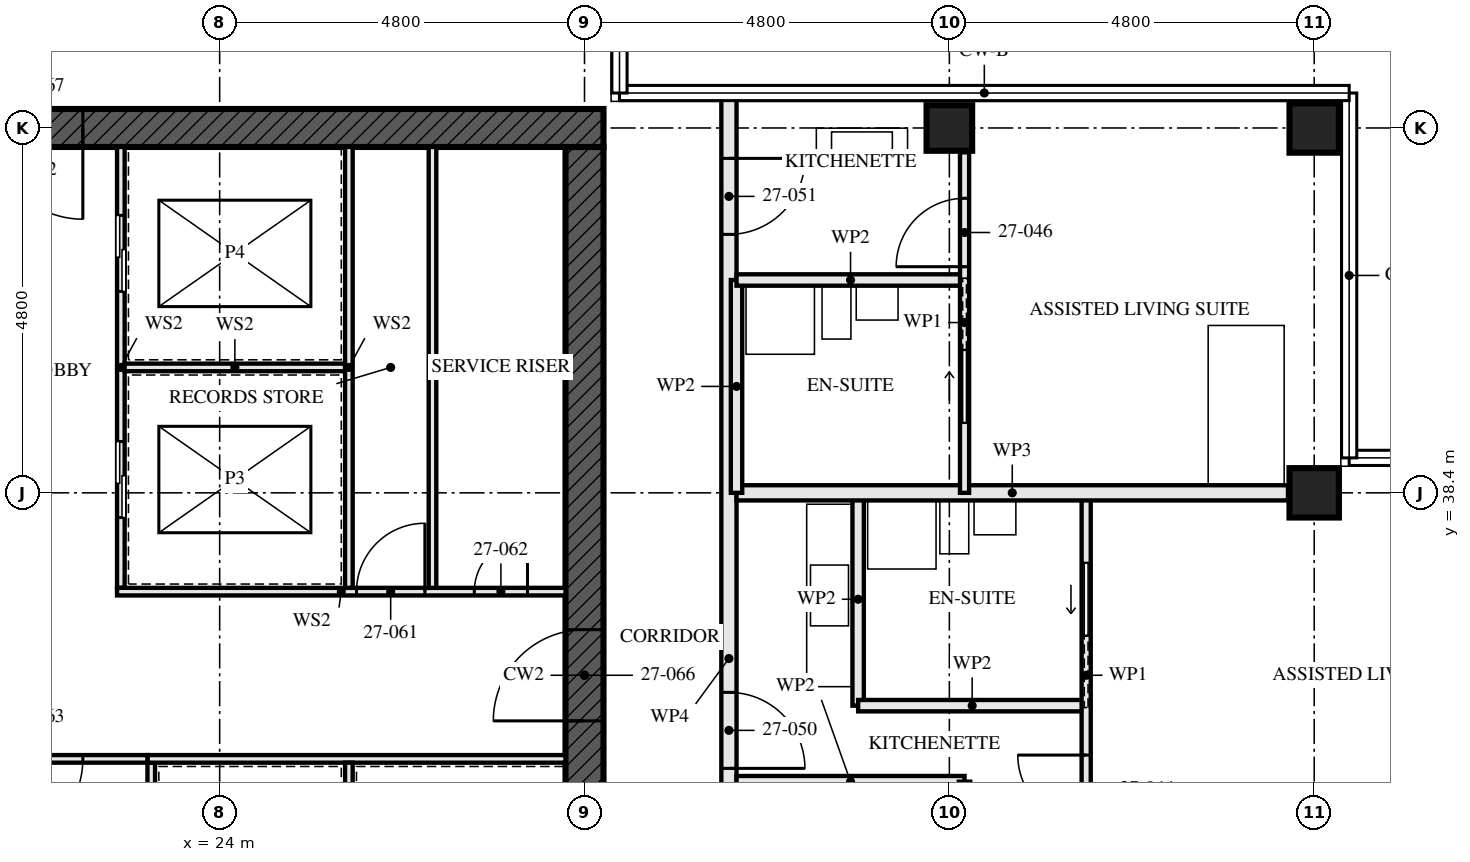
"""IFC4 building model, lengths in metres.
Left out: names, types, materials, properties, quantities, classifications, styles, units other than length and angle.
Written with IfcOpenShell. Run it as: python <this file> out.ifc"""

import sys

from ifc_helpers import new_model, si_unit, direction, frame, frame_2d, origin, origin_2d, place, context, subcontext, project, spatial, rectangle, hollow_rectangle, extrude, element, fill, save


model = new_model("IFC4")
c1 = context("Model", 3, precision=1e-05, world=origin(), true_north=direction((0.0, 1.0)))
c2 = subcontext(c1, "Body", "Model", "MODEL_VIEW")
j1 = project(units=[si_unit("LENGTHUNIT", "METRE"), si_unit("PLANEANGLEUNIT", "RADIAN")], contexts=[c1])
p1 = place(None, origin())
s1 = spatial("IfcSite", under=j1, at=p1, CompositionType="ELEMENT")
p2 = place(p1, origin())
s2 = spatial("IfcBuilding", under=s1, at=p2, CompositionType="ELEMENT")
p3 = place(p2, frame((0.0, 0.0, 101.5)))
s3 = spatial("IfcBuildingStorey", under=s2, at=p3, CompositionType="ELEMENT", Elevation=101.5)
p4 = place(p3, frame((33.6, 43.2, 0.0), z_axis=(0.0, 0.0, 1.0), x_axis=(0.0, 1.0, 0.0)))
e1 = element("IfcColumn", 1, at=p4, inside=s3, PredefinedType="COLUMN", context=c2, shape_type="SweptSolid", body=[
    extrude(hollow_rectangle(XDim=0.6, YDim=0.6, WallThickness=0.08, at=origin_2d()), origin(), (0.0, 0.0, 1.0), 3.5),
])
for number, where, z_axis, x_axis in (
    (2, (38.4, 38.4, 0.0), (0.0, 0.0, 1.0), (0.0, 1.0, 0.0)),
    (3, (38.4, 43.2, 0.0), (0.0, 0.0, 1.0), (0.0, 1.0, 0.0)),
):
    element("IfcColumn", number, at=place(p3, frame(where, z_axis=z_axis, x_axis=x_axis)), inside=s3, PredefinedType="COLUMN", context=c2, shape_type="SweptSolid", body=[
        extrude(hollow_rectangle(XDim=0.65, YDim=0.65, WallThickness=0.08, at=origin_2d()), origin(), (0.0, 0.0, 1.0), 3.5),
    ])
p5 = place(p3, frame((29.05, 43.2, -0.17), z_axis=(0.0, 0.0, 1.0), x_axis=(-1.0, 0.0, 0.0)))
e4 = element("IfcWall", 4, at=p5, inside=s3, PredefinedType="SHEAR", context=c2, shape_type="SweptSolid", body=[
    extrude(rectangle(XDim=14.9, YDim=0.5, at=frame_2d((7.45, 0.0))), origin(), (0.0, 0.0, 1.0), 3.5),
])
p6 = place(p5, frame((6.85, 0.0, 0.17)))
e5 = element("IfcOpeningElement", 5, at=p6, cuts=e4, PredefinedType="OPENING", context=c2, shape_type="SweptSolid", body=[
    extrude(rectangle(XDim=1.2, YDim=2.1, at=frame_2d((0.6, 1.05))), frame((0.0, 0.26, 0.0), z_axis=(0.0, -1.0, 0.0), x_axis=(1.0, 0.0, 0.0)), (0.0, 0.0, 1.0), 0.521),
])
p7 = place(p3, frame((28.8, 29.05, -0.17), z_axis=(0.0, 0.0, 1.0), x_axis=(0.0, 1.0, 0.0)))
e6 = element("IfcWall", 6, at=p7, inside=s3, PredefinedType="SHEAR", context=c2, shape_type="SweptSolid", body=[
    extrude(rectangle(XDim=13.9, YDim=0.5, at=frame_2d((6.95, 0.0))), origin(), (0.0, 0.0, 1.0), 3.5),
])
p8 = place(p7, frame((6.35, 0.0, 0.17)))
e7 = element("IfcOpeningElement", 7, at=p8, cuts=e6, PredefinedType="OPENING", context=c2, shape_type="SweptSolid", body=[
    extrude(rectangle(XDim=1.2, YDim=2.1, at=frame_2d((0.6, 1.05))), frame((0.0, 0.26, 0.0), z_axis=(0.0, -1.0, 0.0), x_axis=(1.0, 0.0, 0.0)), (0.0, 0.0, 1.0), 0.521),
])
p9 = place(p3, frame((33.8, 32.2, 0.0), z_axis=(0.0, 0.0, 1.0), x_axis=(0.0, 1.0, 0.0)))
e8 = element("IfcWall", 8, at=p9, inside=s3, PredefinedType="PARTITIONING", context=c2, shape_type="SweptSolid", body=[
    extrude(rectangle(XDim=2.4, YDim=0.15, at=frame_2d((1.2, 0.0))), origin(), (0.0, 0.0, 1.0), 2.55),
])
for number, where, z_axis, x_axis in (
    (9, (33.8, 34.6, 0.0), (0.0, 0.0, 1.0), (-1.0, 0.0, 0.0)),
    (10, (35.4, 35.6, 0.0), (0.0, 0.0, 1.0), (-1.0, 0.0, 0.0)),
):
    element("IfcWall", number, at=place(p3, frame(where, z_axis=z_axis, x_axis=x_axis)), inside=s3, PredefinedType="PARTITIONING", context=c2, shape_type="SweptSolid", body=[
        extrude(rectangle(XDim=3.0, YDim=0.15, at=frame_2d((1.5, 0.0))), origin(), (0.0, 0.0, 1.0), 3.33),
    ])
p10 = place(p3, frame((32.4, 35.6, 0.0), z_axis=(0.0, 0.0, 1.0), x_axis=(0.0, 1.0, 0.0)))
e11 = element("IfcWall", 11, at=p10, inside=s3, PredefinedType="PARTITIONING", context=c2, shape_type="SweptSolid", body=[
    extrude(rectangle(XDim=2.8, YDim=0.15, at=frame_2d((1.4, 0.0))), origin(), (0.0, 0.0, 1.0), 3.33),
])
p11 = place(p3, frame((35.4, 33.6, 0.0), z_axis=(0.0, 0.0, 1.0), x_axis=(0.0, 1.0, 0.0)))
e12 = element("IfcWall", 12, at=p11, inside=s3, PredefinedType="PARTITIONING", context=c2, shape_type="SweptSolid", body=[
    extrude(rectangle(XDim=4.8, YDim=0.12, at=frame_2d((2.4, 0.0))), origin(), (0.0, 0.0, 1.0), 3.33),
])
p12 = place(p11, frame((0.45, 0.0, 0.0)))
e13 = element("IfcOpeningElement", 13, at=p12, cuts=e12, PredefinedType="OPENING", context=c2, shape_type="SweptSolid", body=[
    extrude(rectangle(XDim=0.9, YDim=2.1, at=frame_2d((0.45, 1.05))), frame((0.0, 0.071, 0.0), z_axis=(0.0, -1.0, 0.0), x_axis=(1.0, 0.0, 0.0)), (0.0, 0.0, 1.0), 0.141),
])
p13 = place(p11, frame((2.925, 0.0, 0.0)))
e14 = element("IfcOpeningElement", 14, at=p13, cuts=e12, PredefinedType="OPENING", context=c2, shape_type="SweptSolid", body=[
    extrude(rectangle(XDim=0.95, YDim=2.1, at=frame_2d((0.475, 1.05))), frame((0.0, 0.071, 0.0), z_axis=(0.0, -1.0, 0.0), x_axis=(1.0, 0.0, 0.0)), (0.0, 0.0, 1.0), 0.141),
])
p14 = place(p3, frame((38.055, 38.4, 0.0), z_axis=(0.0, 0.0, 1.0), x_axis=(-1.0, 0.0, 0.0)))
e15 = element("IfcWall", 15, at=p14, inside=s3, PredefinedType="PARTITIONING", context=c2, shape_type="SweptSolid", body=[
    extrude(rectangle(XDim=7.255, YDim=0.2, at=frame_2d((3.627, 0.0))), origin(), (0.0, 0.0, 1.0), 2.55),
])
p15 = place(p3, frame((33.8, 41.2, 0.0), z_axis=(0.0, 0.0, 1.0), x_axis=(-1.0, 0.0, 0.0)))
e16 = element("IfcWall", 16, at=p15, inside=s3, PredefinedType="PARTITIONING", context=c2, shape_type="SweptSolid", body=[
    extrude(rectangle(XDim=3.0, YDim=0.15, at=frame_2d((1.5, 0.0))), origin(), (0.0, 0.0, 1.0), 3.33),
])
p16 = place(p3, frame((30.8, 38.4, 0.0), z_axis=(0.0, 0.0, 1.0), x_axis=(0.0, 1.0, 0.0)))
e17 = element("IfcWall", 17, at=p16, inside=s3, PredefinedType="PARTITIONING", context=c2, shape_type="SweptSolid", body=[
    extrude(rectangle(XDim=2.8, YDim=0.15, at=frame_2d((1.4, 0.0))), origin(), (0.0, 0.0, 1.0), 3.33),
])
p17 = place(p3, frame((33.8, 38.4, 0.0), z_axis=(0.0, 0.0, 1.0), x_axis=(0.0, 1.0, 0.0)))
e18 = element("IfcWall", 18, at=p17, inside=s3, PredefinedType="PARTITIONING", context=c2, shape_type="SweptSolid", body=[
    extrude(rectangle(XDim=4.48, YDim=0.12, at=frame_2d((2.24, 0.0))), origin(), (0.0, 0.0, 1.0), 3.33),
])
p18 = place(p17, frame((2.975, 0.0, 0.0)))
e19 = element("IfcOpeningElement", 19, at=p18, cuts=e18, PredefinedType="OPENING", context=c2, shape_type="SweptSolid", body=[
    extrude(rectangle(XDim=0.9, YDim=2.1, at=frame_2d((0.45, 1.05))), frame((0.0, 0.071, 0.0), z_axis=(0.0, -1.0, 0.0), x_axis=(1.0, 0.0, 0.0)), (0.0, 0.0, 1.0), 0.141),
])
p19 = place(p17, frame((0.925, 0.0, 0.0)))
e20 = element("IfcOpeningElement", 20, at=p19, cuts=e18, PredefinedType="OPENING", context=c2, shape_type="SweptSolid", body=[
    extrude(rectangle(XDim=0.95, YDim=2.1, at=frame_2d((0.475, 1.05))), frame((0.0, 0.071, 0.0), z_axis=(0.0, -1.0, 0.0), x_axis=(1.0, 0.0, 0.0)), (0.0, 0.0, 1.0), 0.141),
])
p20 = place(p3, frame((30.7, 28.8, 0.0), z_axis=(0.0, 0.0, 1.0), x_axis=(0.0, 1.0, 0.0)))
e21 = element("IfcWall", 21, at=p20, inside=s3, PredefinedType="PARTITIONING", context=c2, shape_type="SweptSolid", body=[
    extrude(rectangle(XDim=14.84, YDim=0.2, at=frame_2d((7.42, 0.0))), origin(), (0.0, 0.0, 1.0), 2.32),
])
p21 = place(p20, frame((1.4, 0.0, 0.0)))
e22 = element("IfcOpeningElement", 22, at=p21, cuts=e21, PredefinedType="OPENING", context=c2, shape_type="SweptSolid", body=[
    extrude(rectangle(XDim=1.0, YDim=2.1, at=frame_2d((0.5, 1.05))), frame((0.0, 0.111, 0.0), z_axis=(0.0, -1.0, 0.0), x_axis=(1.0, 0.0, 0.0)), (0.0, 0.0, 1.0), 0.221),
])
p22 = place(p20, frame((4.1, 0.0, 0.0)))
e23 = element("IfcOpeningElement", 23, at=p22, cuts=e21, PredefinedType="OPENING", context=c2, shape_type="SweptSolid", body=[
    extrude(rectangle(XDim=1.0, YDim=2.1, at=frame_2d((0.5, 1.05))), frame((0.0, 0.111, 0.0), z_axis=(0.0, -1.0, 0.0), x_axis=(1.0, 0.0, 0.0)), (0.0, 0.0, 1.0), 0.221),
])
p23 = place(p20, frame((5.975, 0.0, 0.0)))
e24 = element("IfcOpeningElement", 24, at=p23, cuts=e21, PredefinedType="OPENING", context=c2, shape_type="SweptSolid", body=[
    extrude(rectangle(XDim=1.0, YDim=2.1, at=frame_2d((0.5, 1.05))), frame((0.0, 0.111, 0.0), z_axis=(0.0, -1.0, 0.0), x_axis=(1.0, 0.0, 0.0)), (0.0, 0.0, 1.0), 0.221),
])
p24 = place(p20, frame((13.0, 0.0, 0.0)))
e25 = element("IfcOpeningElement", 25, at=p24, cuts=e21, PredefinedType="OPENING", context=c2, shape_type="SweptSolid", body=[
    extrude(rectangle(XDim=1.0, YDim=2.1, at=frame_2d((0.5, 1.05))), frame((0.0, 0.111, 0.0), z_axis=(0.0, -1.0, 0.0), x_axis=(1.0, 0.0, 0.0)), (0.0, 0.0, 1.0), 0.221),
])
p25 = place(p3, frame((26.8, 37.15, 0.0), z_axis=(0.0, 0.0, 1.0), x_axis=(0.0, 1.0, 0.0)))
e26 = element("IfcWall", 26, at=p25, inside=s3, PredefinedType="SOLIDWALL", context=c2, shape_type="SweptSolid", body=[
    extrude(rectangle(XDim=5.8, YDim=0.1, at=frame_2d((2.9, 0.0))), origin(), (0.0, 0.0, 1.0), 3.33),
])
p26 = place(p3, frame((22.7, 37.15, 0.0), z_axis=(0.0, 0.0, 1.0), x_axis=(0.0, 1.0, 0.0)))
e27 = element("IfcWall", 27, at=p26, inside=s3, PredefinedType="SOLIDWALL", context=c2, shape_type="SweptSolid", body=[
    extrude(rectangle(XDim=5.8, YDim=0.1, at=frame_2d((2.9, 0.0))), origin(), (0.0, 0.0, 1.0), 3.33),
])
p27 = place(p26, frame((0.925, 0.0, 0.0)))
e28 = element("IfcOpeningElement", 28, at=p27, cuts=e27, PredefinedType="OPENING", context=c2, shape_type="SweptSolid", body=[
    extrude(rectangle(XDim=1.0, YDim=2.1, at=frame_2d((0.5, 1.05))), frame((0.0, 0.061, 0.0), z_axis=(0.0, -1.0, 0.0), x_axis=(1.0, 0.0, 0.0)), (0.0, 0.0, 1.0), 0.121),
])
p28 = place(p26, frame((3.9, 0.0, 0.0)))
e29 = element("IfcOpeningElement", 29, at=p28, cuts=e27, PredefinedType="OPENING", context=c2, shape_type="SweptSolid", body=[
    extrude(rectangle(XDim=1.0, YDim=2.1, at=frame_2d((0.5, 1.05))), frame((0.0, 0.061, 0.0), z_axis=(0.0, -1.0, 0.0), x_axis=(1.0, 0.0, 0.0)), (0.0, 0.0, 1.0), 0.121),
])
p29 = place(p3, frame((23.1, 29.05, 0.0), z_axis=(0.0, 0.0, 1.0), x_axis=(0.0, 1.0, 0.0)))
e30 = element("IfcWall", 30, at=p29, inside=s3, PredefinedType="SOLIDWALL", context=c2, shape_type="SweptSolid", body=[
    extrude(rectangle(XDim=5.8, YDim=0.1, at=frame_2d((2.9, 0.0))), origin(), (0.0, 0.0, 1.0), 3.33),
])
p30 = place(p29, frame((1.0, 0.0, 0.0)))
e31 = element("IfcOpeningElement", 31, at=p30, cuts=e30, PredefinedType="OPENING", context=c2, shape_type="SweptSolid", body=[
    extrude(rectangle(XDim=0.7, YDim=2.1, at=frame_2d((0.35, 1.05))), frame((0.0, 0.061, 0.0), z_axis=(0.0, -1.0, 0.0), x_axis=(1.0, 0.0, 0.0)), (0.0, 0.0, 1.0), 0.121),
])
p31 = place(p3, frame((23.05, 34.9, 0.0), z_axis=(0.0, 0.0, 1.0), x_axis=(1.0, 0.0, 0.0)))
e32 = element("IfcWall", 32, at=p31, inside=s3, PredefinedType="SOLIDWALL", context=c2, shape_type="SweptSolid", body=[
    extrude(rectangle(XDim=5.5, YDim=0.1, at=frame_2d((2.75, 0.0))), origin(), (0.0, 0.0, 1.0), 3.33),
])
p32 = place(p3, frame((22.65, 37.1, 0.0), z_axis=(0.0, 0.0, 1.0), x_axis=(1.0, 0.0, 0.0)))
e33 = element("IfcWall", 33, at=p32, inside=s3, PredefinedType="SOLIDWALL", context=c2, shape_type="SweptSolid", body=[
    extrude(rectangle(XDim=5.9, YDim=0.1, at=frame_2d((2.95, 0.0))), origin(), (0.0, 0.0, 1.0), 3.33),
])
p33 = place(p32, frame((3.15, 0.0, 0.0)))
e34 = element("IfcOpeningElement", 34, at=p33, cuts=e33, PredefinedType="OPENING", context=c2, shape_type="SweptSolid", body=[
    extrude(rectangle(XDim=0.9, YDim=2.1, at=frame_2d((0.45, 1.05))), frame((0.0, 0.061, 0.0), z_axis=(0.0, -1.0, 0.0), x_axis=(1.0, 0.0, 0.0)), (0.0, 0.0, 1.0), 0.121),
])
p34 = place(p32, frame((4.7, 0.0, 0.0)))
e35 = element("IfcOpeningElement", 35, at=p34, cuts=e33, PredefinedType="OPENING", context=c2, shape_type="SweptSolid", body=[
    extrude(rectangle(XDim=0.7, YDim=2.1, at=frame_2d((0.35, 1.05))), frame((0.0, 0.061, 0.0), z_axis=(0.0, -1.0, 0.0), x_axis=(1.0, 0.0, 0.0)), (0.0, 0.0, 1.0), 0.121),
])
p35 = place(p3, frame((20.55, 34.9, 0.0), z_axis=(0.0, 0.0, 1.0), x_axis=(1.0, 0.0, 0.0)))
e36 = element("IfcWall", 36, at=p35, inside=s3, PredefinedType="SOLIDWALL", context=c2, shape_type="SweptSolid", body=[
    extrude(rectangle(XDim=2.5, YDim=0.1, at=frame_2d((1.25, 0.0))), origin(), (0.0, 0.0, 1.0), 3.33),
])
p36 = place(p35, frame((0.45, 0.0, 0.0)))
e37 = element("IfcOpeningElement", 37, at=p36, cuts=e36, PredefinedType="OPENING", context=c2, shape_type="SweptSolid", body=[
    extrude(rectangle(XDim=1.2, YDim=2.1, at=frame_2d((0.6, 1.05))), frame((0.0, 0.061, 0.0), z_axis=(0.0, -1.0, 0.0), x_axis=(1.0, 0.0, 0.0)), (0.0, 0.0, 1.0), 0.121),
])
p37 = place(p3, frame((22.75, 40.05, 0.0), z_axis=(0.0, 0.0, 1.0), x_axis=(1.0, 0.0, 0.0)))
e38 = element("IfcWall", 38, at=p37, inside=s3, PredefinedType="SOLIDWALL", context=c2, shape_type="SweptSolid", body=[
    extrude(rectangle(XDim=2.9, YDim=0.1, at=frame_2d((1.45, 0.0))), origin(), (0.0, 0.0, 1.0), 3.33),
])
p38 = place(p3, frame((25.7, 37.15, 0.0), z_axis=(0.0, 0.0, 1.0), x_axis=(0.0, 1.0, 0.0)))
e39 = element("IfcWall", 39, at=p38, inside=s3, PredefinedType="SOLIDWALL", context=c2, shape_type="SweptSolid", body=[
    extrude(rectangle(XDim=5.8, YDim=0.1, at=frame_2d((2.9, 0.0))), origin(), (0.0, 0.0, 1.0), 3.33),
])
p39 = place(p3, frame((25.7, 31.95, 0.0), z_axis=(0.0, 0.0, 1.0), x_axis=(0.0, 1.0, 0.0)))
e40 = element("IfcWall", 40, at=p39, inside=s3, PredefinedType="SOLIDWALL", context=c2, shape_type="SweptSolid", body=[
    extrude(rectangle(XDim=2.9, YDim=0.1, at=frame_2d((1.45, 0.0))), origin(), (0.0, 0.0, 1.0), 3.33),
])
p40 = place(p12, origin())
e41 = element("IfcDoor", 41, at=p40, inside=s3, OperationType="SINGLE_SWING_LEFT", PredefinedType="DOOR", context=c2, shape_type="SweptSolid", body=[
    extrude(rectangle(XDim=0.9, YDim=2.1, at=frame_2d((0.45, 1.05))), frame((0.0, 0.022, 0.0), z_axis=(0.0, -1.0, 0.0), x_axis=(1.0, 0.0, 0.0)), (0.0, 0.0, 1.0), 0.044),
])
fill(e13, e41)
p41 = place(p13, origin())
e42 = element("IfcDoor", 42, at=p41, inside=s3, OperationType="SLIDING_TO_RIGHT", PredefinedType="DOOR", context=c2, shape_type="SweptSolid", body=[
    extrude(rectangle(XDim=0.95, YDim=2.1, at=frame_2d((0.475, 1.05))), frame((0.0, 0.022, 0.0), z_axis=(0.0, -1.0, 0.0), x_axis=(1.0, 0.0, 0.0)), (0.0, 0.0, 1.0), 0.044),
])
fill(e14, e42)
p42 = place(p18, origin())
e43 = element("IfcDoor", 43, at=p42, inside=s3, OperationType="SINGLE_SWING_RIGHT", PredefinedType="DOOR", context=c2, shape_type="SweptSolid", body=[
    extrude(rectangle(XDim=0.9, YDim=2.1, at=frame_2d((0.45, 1.05))), frame((0.0, 0.022, 0.0), z_axis=(0.0, -1.0, 0.0), x_axis=(1.0, 0.0, 0.0)), (0.0, 0.0, 1.0), 0.044),
])
fill(e19, e43)
p43 = place(p19, origin())
e44 = element("IfcDoor", 44, at=p43, inside=s3, OperationType="SLIDING_TO_LEFT", PredefinedType="DOOR", context=c2, shape_type="SweptSolid", body=[
    extrude(rectangle(XDim=0.95, YDim=2.1, at=frame_2d((0.475, 1.05))), frame((0.0, 0.022, 0.0), z_axis=(0.0, -1.0, 0.0), x_axis=(1.0, 0.0, 0.0)), (0.0, 0.0, 1.0), 0.044),
])
fill(e20, e44)
p44 = place(p23, frame((1.0, 0.0, 0.0), z_axis=(0.0, 0.0, 1.0), x_axis=(-1.0, 0.0, 0.0)))
e45 = element("IfcDoor", 45, at=p44, inside=s3, OperationType="SINGLE_SWING_LEFT", PredefinedType="DOOR", context=c2, shape_type="SweptSolid", body=[
    extrude(rectangle(XDim=1.0, YDim=2.1, at=frame_2d((0.5, 1.05))), frame((0.0, 0.027, 0.0), z_axis=(0.0, -1.0, 0.0), x_axis=(1.0, 0.0, 0.0)), (0.0, 0.0, 1.0), 0.054),
])
fill(e24, e45)
p45 = place(p24, frame((1.0, 0.0, 0.0), z_axis=(0.0, 0.0, 1.0), x_axis=(-1.0, 0.0, 0.0)))
e46 = element("IfcDoor", 46, at=p45, inside=s3, OperationType="SINGLE_SWING_RIGHT", PredefinedType="DOOR", context=c2, shape_type="SweptSolid", body=[
    extrude(rectangle(XDim=1.0, YDim=2.1, at=frame_2d((0.5, 1.05))), frame((0.0, 0.027, 0.0), z_axis=(0.0, -1.0, 0.0), x_axis=(1.0, 0.0, 0.0)), (0.0, 0.0, 1.0), 0.054),
])
fill(e25, e46)
p46 = place(p27, origin())
e47 = element("IfcDoor", 47, at=p46, inside=s3, OperationType="SLIDING_TO_LEFT", PredefinedType="DOOR", context=c2, shape_type="SweptSolid", body=[
    extrude(rectangle(XDim=1.0, YDim=2.1, at=frame_2d((0.5, 1.05))), frame((0.0, 0.05, 0.0), z_axis=(0.0, -1.0, 0.0), x_axis=(1.0, 0.0, 0.0)), (0.0, 0.0, 1.0), 0.1),
])
fill(e28, e47)
p47 = place(p28, origin())
e48 = element("IfcDoor", 48, at=p47, inside=s3, OperationType="SLIDING_TO_LEFT", PredefinedType="DOOR", context=c2, shape_type="SweptSolid", body=[
    extrude(rectangle(XDim=1.0, YDim=2.1, at=frame_2d((0.5, 1.05))), frame((0.0, 0.05, 0.0), z_axis=(0.0, -1.0, 0.0), x_axis=(1.0, 0.0, 0.0)), (0.0, 0.0, 1.0), 0.1),
])
fill(e29, e48)
p48 = place(p33, origin())
e49 = element("IfcDoor", 49, at=p48, inside=s3, OperationType="SINGLE_SWING_LEFT", PredefinedType="DOOR", context=c2, shape_type="SweptSolid", body=[
    extrude(rectangle(XDim=0.9, YDim=2.1, at=frame_2d((0.45, 1.05))), frame((0.0, 0.027, 0.0), z_axis=(0.0, -1.0, 0.0), x_axis=(1.0, 0.0, 0.0)), (0.0, 0.0, 1.0), 0.054),
])
fill(e34, e49)
p49 = place(p34, origin())
e50 = element("IfcDoor", 50, at=p49, inside=s3, OperationType="SINGLE_SWING_LEFT", PredefinedType="DOOR", context=c2, shape_type="SweptSolid", body=[
    extrude(rectangle(XDim=0.7, YDim=2.1, at=frame_2d((0.35, 1.05))), frame((0.0, 0.027, 0.0), z_axis=(0.0, -1.0, 0.0), x_axis=(1.0, 0.0, 0.0)), (0.0, 0.0, 1.0), 0.054),
])
fill(e35, e50)
p50 = place(p36, frame((1.2, 0.0, 0.0), z_axis=(0.0, 0.0, 1.0), x_axis=(-1.0, 0.0, 0.0)))
e51 = element("IfcDoor", 51, at=p50, inside=s3, OperationType="SINGLE_SWING_LEFT", PredefinedType="DOOR", context=c2, shape_type="SweptSolid", body=[
    extrude(rectangle(XDim=1.2, YDim=2.1, at=frame_2d((0.6, 1.05))), frame((0.0, 0.027, 0.0), z_axis=(0.0, -1.0, 0.0), x_axis=(1.0, 0.0, 0.0)), (0.0, 0.0, 1.0), 0.054),
])
fill(e37, e51)
p51 = place(p8, origin())
e52 = element("IfcDoor", 52, at=p51, inside=s3, OperationType="SINGLE_SWING_LEFT", PredefinedType="DOOR", context=c2, shape_type="SweptSolid", body=[
    extrude(rectangle(XDim=1.2, YDim=2.1, at=frame_2d((0.6, 1.05))), frame((0.0, 0.027, 0.0), z_axis=(0.0, -1.0, 0.0), x_axis=(1.0, 0.0, 0.0)), (0.0, 0.0, 1.0), 0.054),
])
fill(e7, e52)
p52 = place(p6, origin())
e53 = element("IfcDoor", 53, at=p52, inside=s3, OperationType="SINGLE_SWING_LEFT", PredefinedType="DOOR", context=c2, shape_type="SweptSolid", body=[
    extrude(rectangle(XDim=1.2, YDim=2.1, at=frame_2d((0.6, 1.05))), frame((0.0, 0.027, 0.0), z_axis=(0.0, -1.0, 0.0), x_axis=(1.0, 0.0, 0.0)), (0.0, 0.0, 1.0), 0.054),
])
fill(e5, e53)
save(model, sys.argv[1])
